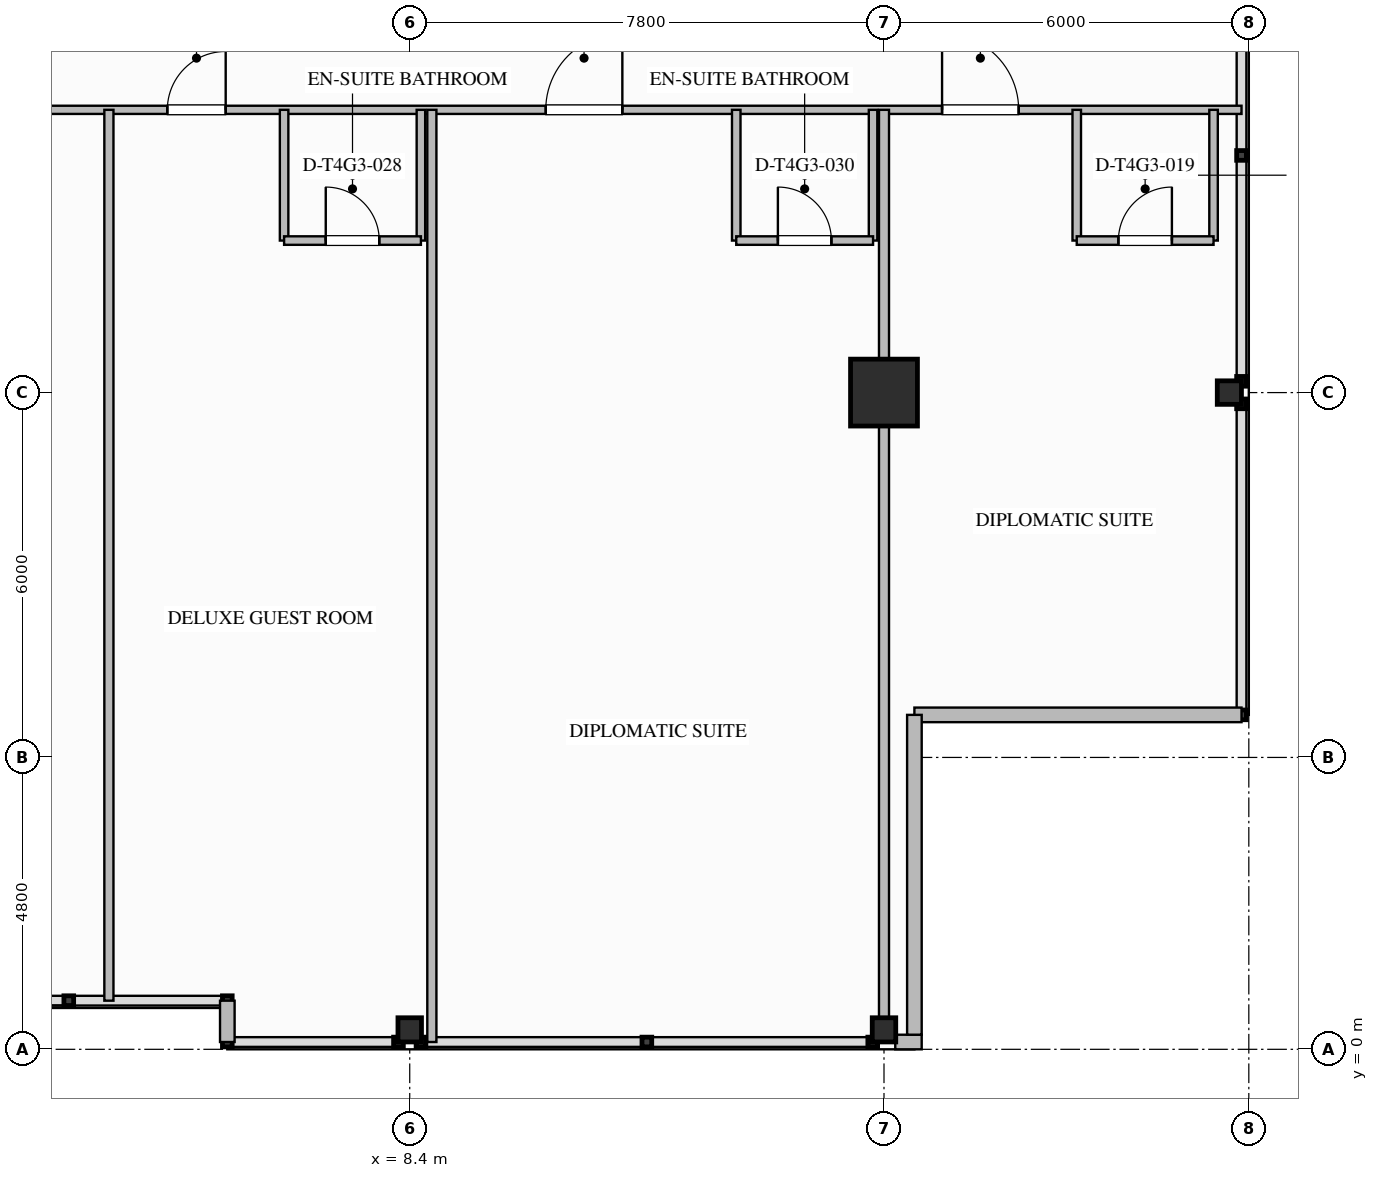
"""IFC4 building model, lengths in metres.
Left out: names, types, materials, properties, quantities, classifications, styles, units other than length and angle.
Written with IfcOpenShell. Run it as: python <this file> out.ifc"""

import sys

from ifc_helpers import new_model, si_unit, direction, frame, frame_2d, origin, origin_2d, place, context, subcontext, project, spatial, rectangle, i_section, extrude, element, fill, save


model = new_model("IFC4")
c1 = context("Model", 3, precision=1e-05, world=origin(), true_north=direction((0.0, 1.0)))
c2 = subcontext(c1, "Body", "Model", "MODEL_VIEW")
j1 = project(units=[si_unit("LENGTHUNIT", "METRE"), si_unit("PLANEANGLEUNIT", "RADIAN")], contexts=[c1])
p1 = place(None, origin())
s1 = spatial("IfcSite", under=j1, at=p1, CompositionType="ELEMENT")
p2 = place(p1, origin())
s2 = spatial("IfcBuilding", under=s1, at=p2, CompositionType="ELEMENT")
p3 = place(p2, frame((0.0, 0.0, 226.7)))
s3 = spatial("IfcBuildingStorey", under=s2, at=p3, CompositionType="ELEMENT", Elevation=226.7)
p4 = place(p3, frame((16.2, 10.8, 0.0), z_axis=(0.0, 0.0, 1.0), x_axis=(1.0, 0.0, 0.0)))
e1 = element("IfcColumn", 1, at=p4, inside=s3, PredefinedType="COLUMN", context=c2, shape_type="SweptSolid", body=[
    extrude(rectangle(XDim=1.1, YDim=1.1, at=origin_2d()), origin(), (0.0, 0.0, 1.0), 3.6),
])
for number, where, z_axis, x_axis in (
    (2, (21.88, 10.8, 0.0), (0.0, 0.0, 1.0), (1.0, 0.0, 0.0)),
    (3, (8.4, 0.32, 0.0), (0.0, 0.0, 1.0), (0.0, 1.0, 0.0)),
    (4, (16.2, 0.32, 0.0), (0.0, 0.0, 1.0), (0.0, 1.0, 0.0)),
):
    element("IfcColumn", number, at=place(p3, frame(where, z_axis=z_axis, x_axis=x_axis)), inside=s3, PredefinedType="COLUMN", context=c2, shape_type="SweptSolid", body=[
        extrude(i_section(OverallWidth=0.397, OverallDepth=0.387, WebThickness=0.021, FlangeThickness=0.033, FilletRadius=0.025, at=origin_2d()), origin(), (0.0, 0.0, 1.0), 3.597),
    ])
p5 = place(p3, frame((16.82, 0.12, 0.0), z_axis=(0.0, 0.0, 1.0), x_axis=(-1.0, 0.0, 0.0)))
e5 = element("IfcWall", 5, at=p5, inside=s3, PredefinedType="STANDARD", context=c2, shape_type="SweptSolid", body=[
    extrude(rectangle(XDim=0.435, YDim=0.24, at=frame_2d((0.217, 0.0))), origin(), (0.0, 0.0, 1.0), 3.34),
])
p6 = place(p3, frame((22.08, 5.5, 0.0), z_axis=(0.0, 0.0, 1.0), x_axis=(-1.0, 0.0, 0.0)))
e6 = element("IfcWall", 6, at=p6, inside=s3, PredefinedType="STANDARD", context=c2, shape_type="SweptSolid", body=[
    extrude(rectangle(XDim=5.38, YDim=0.24, at=frame_2d((2.69, 0.0))), origin(), (0.0, 0.0, 1.0), 3.34),
])
p7 = place(p3, frame((16.7, 5.5, 0.0), z_axis=(0.0, 0.0, 1.0), x_axis=(0.0, -1.0, 0.0)))
e7 = element("IfcWall", 7, at=p7, inside=s3, PredefinedType="STANDARD", context=c2, shape_type="SweptSolid", body=[
    extrude(rectangle(XDim=5.26, YDim=0.24, at=frame_2d((2.63, 0.0))), origin(), (0.0, 0.0, 1.0), 3.34),
])
p8 = place(p3, frame((5.4, 0.12, 0.0), z_axis=(0.0, 0.0, 1.0), x_axis=(0.0, 1.0, 0.0)))
e8 = element("IfcWall", 8, at=p8, inside=s3, PredefinedType="STANDARD", context=c2, shape_type="SweptSolid", body=[
    extrude(rectangle(XDim=0.68, YDim=0.24, at=frame_2d((0.34, 0.0))), origin(), (0.0, 0.0, 1.0), 3.34),
])
p9 = place(p3, frame((-16.2, 15.45, 0.0), z_axis=(0.0, 0.0, 1.0), x_axis=(1.0, 0.0, 0.0)))
e9 = element("IfcWall", 9, at=p9, inside=s3, PredefinedType="PARTITIONING", context=c2, shape_type="SweptSolid", body=[
    extrude(rectangle(XDim=38.28, YDim=0.135, at=frame_2d((19.14, 0.0))), origin(), (0.0, 0.0, 1.0), 3.34),
])
p10 = place(p9, frame((33.355, 0.0, 0.0)))
e10 = element("IfcOpeningElement", 10, at=p10, cuts=e9, PredefinedType="OPENING", context=c2, shape_type="SweptSolid", body=[
    extrude(rectangle(XDim=1.26, YDim=2.2, at=frame_2d((0.63, 1.1))), frame((0.0, 0.077, 0.0), z_axis=(0.0, -1.0, 0.0), x_axis=(1.0, 0.0, 0.0)), (0.0, 0.0, 1.0), 0.155),
])
p11 = place(p9, frame((1.873, 0.0, 0.0)))
e11 = element("IfcOpeningElement", 11, at=p11, cuts=e9, PredefinedType="OPENING", context=c2, shape_type="SweptSolid", body=[
    extrude(rectangle(XDim=1.26, YDim=2.2, at=frame_2d((0.63, 1.1))), frame((0.0, 0.077, 0.0), z_axis=(0.0, -1.0, 0.0), x_axis=(1.0, 0.0, 0.0)), (0.0, 0.0, 1.0), 0.155),
])
p12 = place(p9, frame((8.397, 0.0, 0.0)))
e12 = element("IfcOpeningElement", 12, at=p12, cuts=e9, PredefinedType="OPENING", context=c2, shape_type="SweptSolid", body=[
    extrude(rectangle(XDim=0.96, YDim=2.15, at=frame_2d((0.48, 1.075))), frame((0.0, 0.077, 0.0), z_axis=(0.0, -1.0, 0.0), x_axis=(1.0, 0.0, 0.0)), (0.0, 0.0, 1.0), 0.155),
])
p13 = place(p9, frame((15.69, 0.0, 0.0)))
e13 = element("IfcOpeningElement", 13, at=p13, cuts=e9, PredefinedType="OPENING", context=c2, shape_type="SweptSolid", body=[
    extrude(rectangle(XDim=1.02, YDim=2.15, at=frame_2d((0.51, 1.075))), frame((0.0, 0.077, 0.0), z_axis=(0.0, -1.0, 0.0), x_axis=(1.0, 0.0, 0.0)), (0.0, 0.0, 1.0), 0.155),
])
p14 = place(p9, frame((20.613, 0.0, 0.0)))
e14 = element("IfcOpeningElement", 14, at=p14, cuts=e9, PredefinedType="OPENING", context=c2, shape_type="SweptSolid", body=[
    extrude(rectangle(XDim=0.96, YDim=2.15, at=frame_2d((0.48, 1.075))), frame((0.0, 0.077, 0.0), z_axis=(0.0, -1.0, 0.0), x_axis=(1.0, 0.0, 0.0)), (0.0, 0.0, 1.0), 0.155),
])
p15 = place(p9, frame((26.837, 0.0, 0.0)))
e15 = element("IfcOpeningElement", 15, at=p15, cuts=e9, PredefinedType="OPENING", context=c2, shape_type="SweptSolid", body=[
    extrude(rectangle(XDim=1.26, YDim=2.2, at=frame_2d((0.63, 1.1))), frame((0.0, 0.077, 0.0), z_axis=(0.0, -1.0, 0.0), x_axis=(1.0, 0.0, 0.0)), (0.0, 0.0, 1.0), 0.155),
])
p16 = place(p3, frame((16.2, 0.12, 0.0), z_axis=(0.0, 0.0, 1.0), x_axis=(0.0, 1.0, 0.0)))
e16 = element("IfcWall", 16, at=p16, inside=s3, PredefinedType="PARTITIONING", context=c2, shape_type="SweptSolid", body=[
    extrude(rectangle(XDim=15.33, YDim=0.165, at=frame_2d((7.665, 0.0))), origin(), (0.0, 0.0, 1.0), 2.714),
])
for number, where, z_axis, x_axis in (
    (17, (19.37, 15.45, 0.0), (0.0, 0.0, 1.0), (0.0, -1.0, 0.0)),
    (18, (21.62, 15.45, 0.0), (0.0, 0.0, 1.0), (0.0, -1.0, 0.0)),
):
    element("IfcWall", number, at=place(p3, frame(where, z_axis=z_axis, x_axis=x_axis)), inside=s3, PredefinedType="PLUMBINGWALL", context=c2, shape_type="SweptSolid", body=[
        extrude(rectangle(XDim=2.15, YDim=0.14, at=frame_2d((1.075, 0.0))), origin(), (0.0, 0.0, 1.0), 3.34),
    ])
p17 = place(p3, frame((19.37, 13.3, 0.0), z_axis=(0.0, 0.0, 1.0), x_axis=(1.0, 0.0, 0.0)))
e19 = element("IfcWall", 19, at=p17, inside=s3, PredefinedType="PLUMBINGWALL", context=c2, shape_type="SweptSolid", body=[
    extrude(rectangle(XDim=2.25, YDim=0.14, at=frame_2d((1.125, 0.0))), origin(), (0.0, 0.0, 1.0), 3.34),
])
p18 = place(p17, frame((0.685, 0.0, 0.0)))
e20 = element("IfcOpeningElement", 20, at=p18, cuts=e19, PredefinedType="OPENING", context=c2, shape_type="SweptSolid", body=[
    extrude(rectangle(XDim=0.88, YDim=2.1, at=frame_2d((0.44, 1.05))), frame((0.0, 0.08, 0.0), z_axis=(0.0, -1.0, 0.0), x_axis=(1.0, 0.0, 0.0)), (0.0, 0.0, 1.0), 0.16),
])
p19 = place(p3, frame((3.452, 0.8, 0.0), z_axis=(0.0, 0.0, 1.0), x_axis=(0.0, 1.0, 0.0)))
e21 = element("IfcWall", 21, at=p19, inside=s3, PredefinedType="PARTITIONING", context=c2, shape_type="SweptSolid", body=[
    extrude(rectangle(XDim=14.65, YDim=0.15, at=frame_2d((7.325, 0.0))), origin(), (0.0, 0.0, 1.0), 3.34),
])
p20 = place(p3, frame((6.334, 15.45, 0.0), z_axis=(0.0, 0.0, 1.0), x_axis=(0.0, -1.0, 0.0)))
e22 = element("IfcWall", 22, at=p20, inside=s3, PredefinedType="PLUMBINGWALL", context=c2, shape_type="SweptSolid", body=[
    extrude(rectangle(XDim=2.15, YDim=0.14, at=frame_2d((1.075, 0.0))), origin(), (0.0, 0.0, 1.0), 3.34),
])
p21 = place(p3, frame((8.584, 15.45, 0.0), z_axis=(0.0, 0.0, 1.0), x_axis=(0.0, -1.0, 0.0)))
e23 = element("IfcWall", 23, at=p21, inside=s3, PredefinedType="PLUMBINGWALL", context=c2, shape_type="SweptSolid", body=[
    extrude(rectangle(XDim=2.15, YDim=0.14, at=frame_2d((1.075, 0.0))), origin(), (0.0, 0.0, 1.0), 2.718),
])
p22 = place(p3, frame((6.334, 13.3, 0.0), z_axis=(0.0, 0.0, 1.0), x_axis=(1.0, 0.0, 0.0)))
e24 = element("IfcWall", 24, at=p22, inside=s3, PredefinedType="PLUMBINGWALL", context=c2, shape_type="SweptSolid", body=[
    extrude(rectangle(XDim=2.25, YDim=0.14, at=frame_2d((1.125, 0.0))), origin(), (0.0, 0.0, 1.0), 3.34),
])
p23 = place(p22, frame((0.685, 0.0, 0.0)))
e25 = element("IfcOpeningElement", 25, at=p23, cuts=e24, PredefinedType="OPENING", context=c2, shape_type="SweptSolid", body=[
    extrude(rectangle(XDim=0.88, YDim=2.1, at=frame_2d((0.44, 1.05))), frame((0.0, 0.08, 0.0), z_axis=(0.0, -1.0, 0.0), x_axis=(1.0, 0.0, 0.0)), (0.0, 0.0, 1.0), 0.16),
])
p24 = place(p3, frame((8.764, 0.12, 0.0), z_axis=(0.0, 0.0, 1.0), x_axis=(0.0, 1.0, 0.0)))
e26 = element("IfcWall", 26, at=p24, inside=s3, PredefinedType="PARTITIONING", context=c2, shape_type="SweptSolid", body=[
    extrude(rectangle(XDim=15.33, YDim=0.15, at=frame_2d((7.665, 0.0))), origin(), (0.0, 0.0, 1.0), 3.34),
])
p25 = place(p3, frame((13.77, 15.45, 0.0), z_axis=(0.0, 0.0, 1.0), x_axis=(0.0, -1.0, 0.0)))
e27 = element("IfcWall", 27, at=p25, inside=s3, PredefinedType="PLUMBINGWALL", context=c2, shape_type="SweptSolid", body=[
    extrude(rectangle(XDim=2.15, YDim=0.14, at=frame_2d((1.075, 0.0))), origin(), (0.0, 0.0, 1.0), 3.34),
])
p26 = place(p3, frame((16.02, 15.45, 0.0), z_axis=(0.0, 0.0, 1.0), x_axis=(0.0, -1.0, 0.0)))
e28 = element("IfcWall", 28, at=p26, inside=s3, PredefinedType="PLUMBINGWALL", context=c2, shape_type="SweptSolid", body=[
    extrude(rectangle(XDim=2.15, YDim=0.14, at=frame_2d((1.075, 0.0))), origin(), (0.0, 0.0, 1.0), 2.714),
])
p27 = place(p3, frame((13.77, 13.3, 0.0), z_axis=(0.0, 0.0, 1.0), x_axis=(1.0, 0.0, 0.0)))
e29 = element("IfcWall", 29, at=p27, inside=s3, PredefinedType="PLUMBINGWALL", context=c2, shape_type="SweptSolid", body=[
    extrude(rectangle(XDim=2.25, YDim=0.14, at=frame_2d((1.125, 0.0))), origin(), (0.0, 0.0, 1.0), 3.34),
])
p28 = place(p27, frame((0.685, 0.0, 0.0)))
e30 = element("IfcOpeningElement", 30, at=p28, cuts=e29, PredefinedType="OPENING", context=c2, shape_type="SweptSolid", body=[
    extrude(rectangle(XDim=0.88, YDim=2.1, at=frame_2d((0.44, 1.05))), frame((0.0, 0.08, 0.0), z_axis=(0.0, -1.0, 0.0), x_axis=(1.0, 0.0, 0.0)), (0.0, 0.0, 1.0), 0.16),
])
p29 = place(p18, origin())
e31 = element("IfcDoor", 31, at=p29, inside=s3, OperationType="SINGLE_SWING_RIGHT", PredefinedType="DOOR", context=c2, shape_type="SweptSolid", body=[
    extrude(rectangle(XDim=0.88, YDim=2.1, at=frame_2d((0.44, 1.05))), frame((0.0, 0.025, 0.0), z_axis=(0.0, -1.0, 0.0), x_axis=(1.0, 0.0, 0.0)), (0.0, 0.0, 1.0), 0.05),
])
fill(e20, e31)
p30 = place(p10, origin())
e32 = element("IfcDoor", 32, at=p30, inside=s3, OperationType="SINGLE_SWING_LEFT", PredefinedType="DOOR", context=c2, shape_type="SweptSolid", body=[
    extrude(rectangle(XDim=1.26, YDim=2.2, at=frame_2d((0.63, 1.1))), frame((0.0, 0.025, 0.0), z_axis=(0.0, -1.0, 0.0), x_axis=(1.0, 0.0, 0.0)), (0.0, 0.0, 1.0), 0.05),
])
fill(e10, e32)
p31 = place(p23, origin())
e33 = element("IfcDoor", 33, at=p31, inside=s3, OperationType="SINGLE_SWING_LEFT", PredefinedType="DOOR", context=c2, shape_type="SweptSolid", body=[
    extrude(rectangle(XDim=0.88, YDim=2.1, at=frame_2d((0.44, 1.05))), frame((0.0, 0.025, 0.0), z_axis=(0.0, -1.0, 0.0), x_axis=(1.0, 0.0, 0.0)), (0.0, 0.0, 1.0), 0.05),
])
fill(e25, e33)
p32 = place(p14, origin())
e34 = element("IfcDoor", 34, at=p32, inside=s3, OperationType="SINGLE_SWING_RIGHT", PredefinedType="DOOR", context=c2, shape_type="SweptSolid", body=[
    extrude(rectangle(XDim=0.96, YDim=2.15, at=frame_2d((0.48, 1.075))), frame((0.0, 0.025, 0.0), z_axis=(0.0, -1.0, 0.0), x_axis=(1.0, 0.0, 0.0)), (0.0, 0.0, 1.0), 0.05),
])
fill(e14, e34)
p33 = place(p28, origin())
e35 = element("IfcDoor", 35, at=p33, inside=s3, OperationType="SINGLE_SWING_LEFT", PredefinedType="DOOR", context=c2, shape_type="SweptSolid", body=[
    extrude(rectangle(XDim=0.88, YDim=2.1, at=frame_2d((0.44, 1.05))), frame((0.0, 0.025, 0.0), z_axis=(0.0, -1.0, 0.0), x_axis=(1.0, 0.0, 0.0)), (0.0, 0.0, 1.0), 0.05),
])
fill(e30, e35)
p34 = place(p15, origin())
e36 = element("IfcDoor", 36, at=p34, inside=s3, OperationType="SINGLE_SWING_RIGHT", PredefinedType="DOOR", context=c2, shape_type="SweptSolid", body=[
    extrude(rectangle(XDim=1.26, YDim=2.2, at=frame_2d((0.63, 1.1))), frame((0.0, 0.025, 0.0), z_axis=(0.0, -1.0, 0.0), x_axis=(1.0, 0.0, 0.0)), (0.0, 0.0, 1.0), 0.05),
])
fill(e15, e36)
save(model, sys.argv[1])
